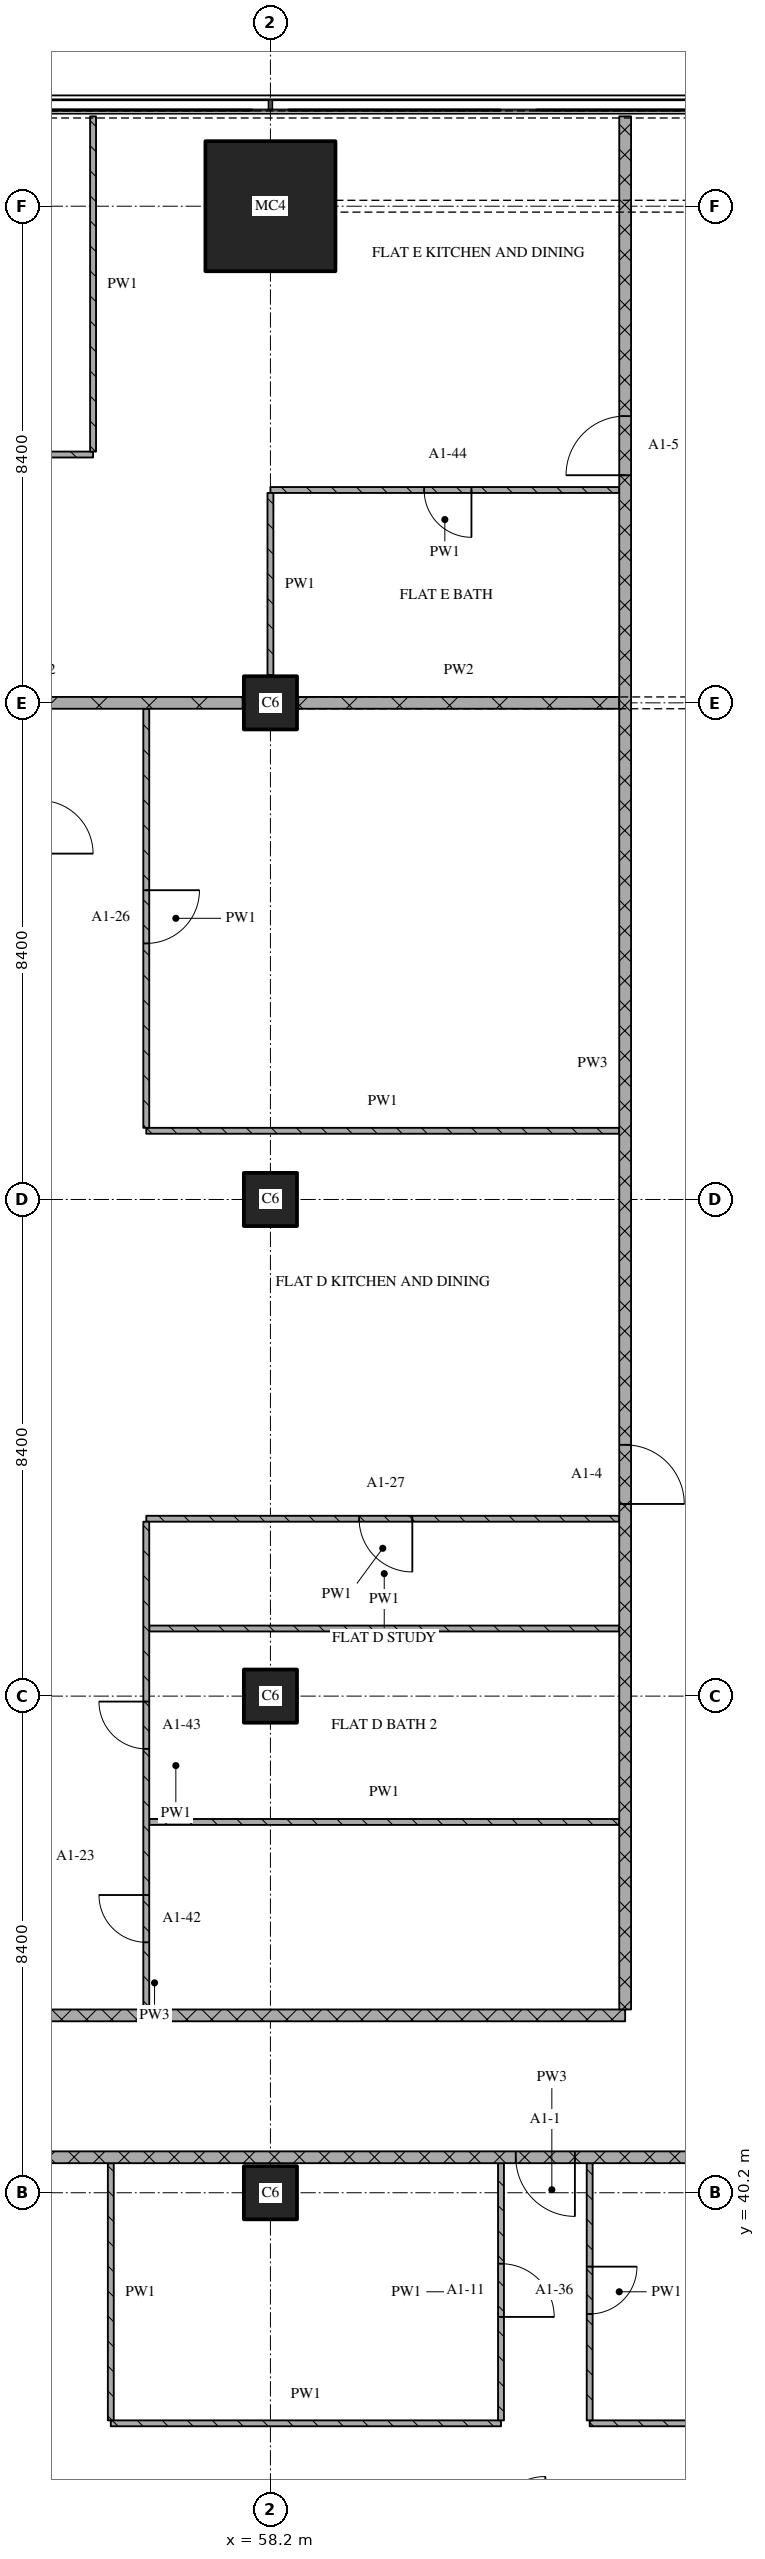
"""IFC4 building model, lengths in metres.
Left out: names, types, materials, properties, quantities, classifications, styles, units other than length and angle.
Written with IfcOpenShell. Run it as: python <this file> out.ifc"""

import sys

from ifc_helpers import new_model, si_unit, direction, frame, frame_2d, origin, origin_2d, place, context, subcontext, project, spatial, rectangle, extrude, element, fill, save


model = new_model("IFC4")
c1 = context("Model", 3, precision=1e-05, world=origin(), true_north=direction((0.0, 1.0)))
c2 = subcontext(c1, "Body", "Model", "MODEL_VIEW")
j1 = project(units=[si_unit("LENGTHUNIT", "METRE"), si_unit("PLANEANGLEUNIT", "RADIAN")], contexts=[c1])
p1 = place(None, origin())
s1 = spatial("IfcSite", under=j1, at=p1, CompositionType="ELEMENT")
p2 = place(p1, origin())
s2 = spatial("IfcBuilding", under=s1, at=p2, CompositionType="ELEMENT")
p3 = place(p2, frame((0.0, 0.0, 44.4)))
s3 = spatial("IfcBuildingStorey", under=s2, at=p3, CompositionType="ELEMENT", Elevation=44.4)
for number, where, z_axis, x_axis in (
    (1, (58.2, 40.2, 0.0), (0.0, 0.0, 1.0), (1.0, 0.0, 0.0)),
    (2, (58.2, 48.6, 0.0), (0.0, 0.0, 1.0), (1.0, 0.0, 0.0)),
    (3, (58.2, 57.0, 0.0), (0.0, 0.0, 1.0), (1.0, 0.0, 0.0)),
    (4, (58.2, 65.4, 0.0), (0.0, 0.0, 1.0), (1.0, 0.0, 0.0)),
):
    element("IfcColumn", number, at=place(p3, frame(where, z_axis=z_axis, x_axis=x_axis)), inside=s3, PredefinedType="COLUMN", context=c2, shape_type="SweptSolid", body=[
        extrude(rectangle(XDim=0.9, YDim=0.9, at=origin_2d()), origin(), (0.0, 0.0, 1.0), 3.6),
    ])
p4 = place(p3, frame((58.2, 73.8, 0.0), z_axis=(0.0, 0.0, 1.0), x_axis=(1.0, 0.0, 0.0)))
e5 = element("IfcColumn", 5, at=p4, inside=s3, PredefinedType="COLUMN", context=c2, shape_type="SweptSolid", body=[
    extrude(rectangle(XDim=2.2, YDim=2.2, at=origin_2d()), origin(), (0.0, 0.0, 1.0), 3.6),
])
p5 = place(p3, frame((55.5, 36.3, 0.0), z_axis=(0.0, 0.0, 1.0), x_axis=(1.0, 0.0, 0.0)))
e6 = element("IfcWall", 6, at=p5, inside=s3, PredefinedType="PARTITIONING", context=c2, shape_type="SweptSolid", body=[
    extrude(rectangle(XDim=6.6, YDim=0.1, at=frame_2d((3.3, 0.0))), origin(), (0.0, 0.0, 1.0), 3.32),
])
p6 = place(p3, frame((63.6, 36.3, 0.0), z_axis=(0.0, 0.0, 1.0), x_axis=(1.0, 0.0, 0.0)))
e7 = element("IfcWall", 7, at=p6, inside=s3, PredefinedType="PARTITIONING", context=c2, shape_type="SweptSolid", body=[
    extrude(rectangle(XDim=11.3, YDim=0.1, at=frame_2d((5.65, 0.0))), origin(), (0.0, 0.0, 1.0), 3.32),
])
p7 = place(p6, frame((6.35, 0.0, 0.0)))
e8 = element("IfcOpeningElement", 8, at=p7, cuts=e7, PredefinedType="OPENING", context=c2, shape_type="SweptSolid", body=[
    extrude(rectangle(XDim=0.8, YDim=2.1, at=frame_2d((0.4, 1.05))), frame((0.0, 0.06, 0.0), z_axis=(0.0, -1.0, 0.0), x_axis=(1.0, 0.0, 0.0)), (0.0, 0.0, 1.0), 0.12),
])
p8 = place(p6, frame((9.75, 0.0, 0.0)))
e9 = element("IfcOpeningElement", 9, at=p8, cuts=e7, PredefinedType="OPENING", context=c2, shape_type="SweptSolid", body=[
    extrude(rectangle(XDim=0.9, YDim=2.1, at=frame_2d((0.45, 1.05))), frame((0.0, 0.06, 0.0), z_axis=(0.0, -1.0, 0.0), x_axis=(1.0, 0.0, 0.0)), (0.0, 0.0, 1.0), 0.12),
])
p9 = place(p3, frame((75.0, 40.8, 0.0), z_axis=(0.0, 0.0, 1.0), x_axis=(-1.0, 0.0, 0.0)))
e10 = element("IfcWall", 10, at=p9, inside=s3, PredefinedType="PARTITIONING", context=c2, shape_type="SweptSolid", body=[
    extrude(rectangle(XDim=24.08, YDim=0.2, at=frame_2d((12.04, 0.0))), origin(), (0.0, 0.0, 1.0), 3.32),
])
p10 = place(p9, frame((11.65, 0.0, 0.0)))
e11 = element("IfcOpeningElement", 11, at=p10, cuts=e10, PredefinedType="OPENING", context=c2, shape_type="SweptSolid", body=[
    extrude(rectangle(XDim=1.0, YDim=2.1, at=frame_2d((0.5, 1.05))), frame((0.0, 0.11, 0.0), z_axis=(0.0, -1.0, 0.0), x_axis=(1.0, 0.0, 0.0)), (0.0, 0.0, 1.0), 0.22),
])
p11 = place(p3, frame((48.28, 43.2, 0.0), z_axis=(0.0, 0.0, 1.0), x_axis=(1.0, 0.0, 0.0)))
e12 = element("IfcWall", 12, at=p11, inside=s3, PredefinedType="PARTITIONING", context=c2, shape_type="SweptSolid", body=[
    extrude(rectangle(XDim=15.92, YDim=0.2, at=frame_2d((7.96, 0.0))), origin(), (0.0, 0.0, 1.0), 3.32),
])
for number, where, z_axis, x_axis in (
    (13, (56.15, 46.472, 0.0), (0.0, 0.0, 1.0), (1.0, 0.0, 0.0)),
    (14, (56.15, 49.743, 0.0), (0.0, 0.0, 1.0), (1.0, 0.0, 0.0)),
):
    element("IfcWall", number, at=place(p3, frame(where, z_axis=z_axis, x_axis=x_axis)), inside=s3, PredefinedType="PARTITIONING", context=c2, shape_type="SweptSolid", body=[
        extrude(rectangle(XDim=7.95, YDim=0.1, at=frame_2d((3.975, 0.0))), origin(), (0.0, 0.0, 1.0), 3.32),
    ])
p12 = place(p3, frame((64.1, 51.6, 0.0), z_axis=(0.0, 0.0, 1.0), x_axis=(-1.0, 0.0, 0.0)))
e15 = element("IfcWall", 15, at=p12, inside=s3, PredefinedType="PARTITIONING", context=c2, shape_type="SweptSolid", body=[
    extrude(rectangle(XDim=8.0, YDim=0.1, at=frame_2d((4.0, 0.0))), origin(), (0.0, 0.0, 1.0), 3.32),
])
p13 = place(p12, frame((3.5, 0.0, 0.0)))
e16 = element("IfcOpeningElement", 16, at=p13, cuts=e15, PredefinedType="OPENING", context=c2, shape_type="SweptSolid", body=[
    extrude(rectangle(XDim=0.9, YDim=2.1, at=frame_2d((0.45, 1.05))), frame((0.0, 0.06, 0.0), z_axis=(0.0, -1.0, 0.0), x_axis=(1.0, 0.0, 0.0)), (0.0, 0.0, 1.0), 0.12),
])
p14 = place(p3, frame((56.1, 58.162, 0.0), z_axis=(0.0, 0.0, 1.0), x_axis=(1.0, 0.0, 0.0)))
e17 = element("IfcWall", 17, at=p14, inside=s3, PredefinedType="PARTITIONING", context=c2, shape_type="SweptSolid", body=[
    extrude(rectangle(XDim=8.0, YDim=0.1, at=frame_2d((4.0, 0.0))), origin(), (0.0, 0.0, 1.0), 3.32),
])
p15 = place(p3, frame((50.92, 65.4, 0.0), z_axis=(0.0, 0.0, 1.0), x_axis=(1.0, 0.0, 0.0)))
e18 = element("IfcWall", 18, at=p15, inside=s3, PredefinedType="PARTITIONING", context=c2, shape_type="SweptSolid", body=[
    extrude(rectangle(XDim=6.81, YDim=0.2, at=frame_2d((3.405, 0.0))), origin(), (0.0, 0.0, 1.0), 3.32),
])
p16 = place(p3, frame((58.67, 65.4, 0.0), z_axis=(0.0, 0.0, 1.0), x_axis=(1.0, 0.0, 0.0)))
e19 = element("IfcWall", 19, at=p16, inside=s3, PredefinedType="PARTITIONING", context=c2, shape_type="SweptSolid", body=[
    extrude(rectangle(XDim=5.43, YDim=0.2, at=frame_2d((2.715, 0.0))), origin(), (0.0, 0.0, 1.0), 2.82),
])
p17 = place(p3, frame((64.1, 69.0, 0.0), z_axis=(0.0, 0.0, 1.0), x_axis=(-1.0, 0.0, 0.0)))
e20 = element("IfcWall", 20, at=p17, inside=s3, PredefinedType="PARTITIONING", context=c2, shape_type="SweptSolid", body=[
    extrude(rectangle(XDim=5.9, YDim=0.1, at=frame_2d((2.95, 0.0))), origin(), (0.0, 0.0, 1.0), 3.32),
])
p18 = place(p17, frame((2.5, 0.0, 0.0)))
e21 = element("IfcOpeningElement", 21, at=p18, cuts=e20, PredefinedType="OPENING", context=c2, shape_type="SweptSolid", body=[
    extrude(rectangle(XDim=0.8, YDim=2.1, at=frame_2d((0.4, 1.05))), frame((0.0, 0.06, 0.0), z_axis=(0.0, -1.0, 0.0), x_axis=(1.0, 0.0, 0.0)), (0.0, 0.0, 1.0), 0.12),
])
p19 = place(p3, frame((48.28, 69.6, 0.0), z_axis=(0.0, 0.0, 1.0), x_axis=(1.0, 0.0, 0.0)))
e22 = element("IfcWall", 22, at=p19, inside=s3, PredefinedType="PARTITIONING", context=c2, shape_type="SweptSolid", body=[
    extrude(rectangle(XDim=6.92, YDim=0.1, at=frame_2d((3.46, 0.0))), origin(), (0.0, 0.0, 1.0), 3.32),
])
p20 = place(p19, frame((3.905, 0.0, 0.0)))
e23 = element("IfcOpeningElement", 23, at=p20, cuts=e22, PredefinedType="OPENING", context=c2, shape_type="SweptSolid", body=[
    extrude(rectangle(XDim=0.9, YDim=2.1, at=frame_2d((0.45, 1.05))), frame((0.0, 0.06, 0.0), z_axis=(0.0, -1.0, 0.0), x_axis=(1.0, 0.0, 0.0)), (0.0, 0.0, 1.0), 0.12),
])
p21 = place(p3, frame((55.2, 75.32, 0.0), z_axis=(0.0, 0.0, 1.0), x_axis=(0.0, -1.0, 0.0)))
e24 = element("IfcWall", 24, at=p21, inside=s3, PredefinedType="PARTITIONING", context=c2, shape_type="SweptSolid", body=[
    extrude(rectangle(XDim=5.67, YDim=0.1, at=frame_2d((2.835, 0.0))), origin(), (0.0, 0.0, 1.0), 3.32),
])
p22 = place(p3, frame((55.5, 40.7, 0.0), z_axis=(0.0, 0.0, 1.0), x_axis=(0.0, -1.0, 0.0)))
e25 = element("IfcWall", 25, at=p22, inside=s3, PredefinedType="PARTITIONING", context=c2, shape_type="SweptSolid", body=[
    extrude(rectangle(XDim=4.35, YDim=0.1, at=frame_2d((2.175, 0.0))), origin(), (0.0, 0.0, 1.0), 3.32),
])
p23 = place(p3, frame((56.1, 51.55, 0.0), z_axis=(0.0, 0.0, 1.0), x_axis=(0.0, -1.0, 0.0)))
e26 = element("IfcWall", 26, at=p23, inside=s3, PredefinedType="PARTITIONING", context=c2, shape_type="SweptSolid", body=[
    extrude(rectangle(XDim=8.25, YDim=0.1, at=frame_2d((4.125, 0.0))), origin(), (0.0, 0.0, 1.0), 3.32),
])
p24 = place(p23, frame((3.042, 0.0, 0.0)))
e27 = element("IfcOpeningElement", 27, at=p24, cuts=e26, PredefinedType="OPENING", context=c2, shape_type="SweptSolid", body=[
    extrude(rectangle(XDim=0.8, YDim=2.1, at=frame_2d((0.4, 1.05))), frame((0.0, 0.06, 0.0), z_axis=(0.0, -1.0, 0.0), x_axis=(1.0, 0.0, 0.0)), (0.0, 0.0, 1.0), 0.12),
])
p25 = place(p23, frame((6.314, 0.0, 0.0)))
e28 = element("IfcOpeningElement", 28, at=p25, cuts=e26, PredefinedType="OPENING", context=c2, shape_type="SweptSolid", body=[
    extrude(rectangle(XDim=0.8, YDim=2.1, at=frame_2d((0.4, 1.05))), frame((0.0, 0.06, 0.0), z_axis=(0.0, -1.0, 0.0), x_axis=(1.0, 0.0, 0.0)), (0.0, 0.0, 1.0), 0.12),
])
p26 = place(p3, frame((56.1, 65.3, 0.0), z_axis=(0.0, 0.0, 1.0), x_axis=(0.0, -1.0, 0.0)))
e29 = element("IfcWall", 29, at=p26, inside=s3, PredefinedType="PARTITIONING", context=c2, shape_type="SweptSolid", body=[
    extrude(rectangle(XDim=7.088, YDim=0.1, at=frame_2d((3.544, 0.0))), origin(), (0.0, 0.0, 1.0), 3.32),
])
p27 = place(p26, frame((3.069, 0.0, 0.0)))
e30 = element("IfcOpeningElement", 30, at=p27, cuts=e29, PredefinedType="OPENING", context=c2, shape_type="SweptSolid", body=[
    extrude(rectangle(XDim=0.9, YDim=2.1, at=frame_2d((0.45, 1.05))), frame((0.0, 0.06, 0.0), z_axis=(0.0, -1.0, 0.0), x_axis=(1.0, 0.0, 0.0)), (0.0, 0.0, 1.0), 0.12),
])
p28 = place(p3, frame((58.2, 68.95, 0.0), z_axis=(0.0, 0.0, 1.0), x_axis=(0.0, -1.0, 0.0)))
e31 = element("IfcWall", 31, at=p28, inside=s3, PredefinedType="PARTITIONING", context=c2, shape_type="SweptSolid", body=[
    extrude(rectangle(XDim=3.08, YDim=0.1, at=frame_2d((1.54, 0.0))), origin(), (0.0, 0.0, 1.0), 3.32),
])
p29 = place(p3, frame((62.1, 36.35, 0.0), z_axis=(0.0, 0.0, 1.0), x_axis=(0.0, 1.0, 0.0)))
e32 = element("IfcWall", 32, at=p29, inside=s3, PredefinedType="PARTITIONING", context=c2, shape_type="SweptSolid", body=[
    extrude(rectangle(XDim=4.35, YDim=0.1, at=frame_2d((2.175, 0.0))), origin(), (0.0, 0.0, 1.0), 3.32),
])
p30 = place(p29, frame((1.75, 0.0, 0.0)))
e33 = element("IfcOpeningElement", 33, at=p30, cuts=e32, PredefinedType="OPENING", context=c2, shape_type="SweptSolid", body=[
    extrude(rectangle(XDim=0.9, YDim=2.1, at=frame_2d((0.45, 1.05))), frame((0.0, 0.06, 0.0), z_axis=(0.0, -1.0, 0.0), x_axis=(1.0, 0.0, 0.0)), (0.0, 0.0, 1.0), 0.12),
])
p31 = place(p3, frame((63.6, 40.7, 0.0), z_axis=(0.0, 0.0, 1.0), x_axis=(0.0, -1.0, 0.0)))
e34 = element("IfcWall", 34, at=p31, inside=s3, PredefinedType="PARTITIONING", context=c2, shape_type="SweptSolid", body=[
    extrude(rectangle(XDim=4.35, YDim=0.1, at=frame_2d((2.175, 0.0))), origin(), (0.0, 0.0, 1.0), 3.32),
])
p32 = place(p31, frame((1.75, 0.0, 0.0)))
e35 = element("IfcOpeningElement", 35, at=p32, cuts=e34, PredefinedType="OPENING", context=c2, shape_type="SweptSolid", body=[
    extrude(rectangle(XDim=0.8, YDim=2.1, at=frame_2d((0.4, 1.05))), frame((0.0, 0.06, 0.0), z_axis=(0.0, -1.0, 0.0), x_axis=(1.0, 0.0, 0.0)), (0.0, 0.0, 1.0), 0.12),
])
p33 = place(p3, frame((64.2, 43.3, 0.0), z_axis=(0.0, 0.0, 1.0), x_axis=(0.0, 1.0, 0.0)))
e36 = element("IfcWall", 36, at=p33, inside=s3, PredefinedType="PARTITIONING", context=c2, shape_type="SweptSolid", body=[
    extrude(rectangle(XDim=32.02, YDim=0.2, at=frame_2d((16.01, 0.0))), origin(), (0.0, 0.0, 1.0), 3.32),
])
p34 = place(p33, frame((8.55, 0.0, 0.0)))
e37 = element("IfcOpeningElement", 37, at=p34, cuts=e36, PredefinedType="OPENING", context=c2, shape_type="SweptSolid", body=[
    extrude(rectangle(XDim=1.0, YDim=2.1, at=frame_2d((0.5, 1.05))), frame((0.0, 0.11, 0.0), z_axis=(0.0, -1.0, 0.0), x_axis=(1.0, 0.0, 0.0)), (0.0, 0.0, 1.0), 0.22),
])
p35 = place(p33, frame((25.95, 0.0, 0.0)))
e38 = element("IfcOpeningElement", 38, at=p35, cuts=e36, PredefinedType="OPENING", context=c2, shape_type="SweptSolid", body=[
    extrude(rectangle(XDim=1.0, YDim=2.1, at=frame_2d((0.5, 1.05))), frame((0.0, 0.11, 0.0), z_axis=(0.0, -1.0, 0.0), x_axis=(1.0, 0.0, 0.0)), (0.0, 0.0, 1.0), 0.22),
])
p36 = place(p10, origin())
e39 = element("IfcDoor", 39, at=p36, inside=s3, OperationType="SINGLE_SWING_LEFT", PredefinedType="DOOR", context=c2, shape_type="SweptSolid", body=[
    extrude(rectangle(XDim=1.0, YDim=2.1, at=frame_2d((0.5, 1.05))), frame((0.0, 0.025, 0.0), z_axis=(0.0, -1.0, 0.0), x_axis=(1.0, 0.0, 0.0)), (0.0, 0.0, 1.0), 0.05),
])
fill(e11, e39)
p37 = place(p13, origin())
e40 = element("IfcDoor", 40, at=p37, inside=s3, OperationType="SINGLE_SWING_LEFT", PredefinedType="DOOR", context=c2, shape_type="SweptSolid", body=[
    extrude(rectangle(XDim=0.9, YDim=2.1, at=frame_2d((0.45, 1.05))), frame((0.0, 0.025, 0.0), z_axis=(0.0, -1.0, 0.0), x_axis=(1.0, 0.0, 0.0)), (0.0, 0.0, 1.0), 0.05),
])
fill(e16, e40)
p38 = place(p18, origin())
e41 = element("IfcDoor", 41, at=p38, inside=s3, OperationType="SINGLE_SWING_LEFT", PredefinedType="DOOR", context=c2, shape_type="SweptSolid", body=[
    extrude(rectangle(XDim=0.8, YDim=2.1, at=frame_2d((0.4, 1.05))), frame((0.0, 0.025, 0.0), z_axis=(0.0, -1.0, 0.0), x_axis=(1.0, 0.0, 0.0)), (0.0, 0.0, 1.0), 0.05),
])
fill(e21, e41)
p39 = place(p24, origin())
e42 = element("IfcDoor", 42, at=p39, inside=s3, OperationType="SINGLE_SWING_RIGHT", PredefinedType="DOOR", context=c2, shape_type="SweptSolid", body=[
    extrude(rectangle(XDim=0.8, YDim=2.1, at=frame_2d((0.4, 1.05))), frame((0.0, 0.025, 0.0), z_axis=(0.0, -1.0, 0.0), x_axis=(1.0, 0.0, 0.0)), (0.0, 0.0, 1.0), 0.05),
])
fill(e27, e42)
p40 = place(p25, origin())
e43 = element("IfcDoor", 43, at=p40, inside=s3, OperationType="SINGLE_SWING_RIGHT", PredefinedType="DOOR", context=c2, shape_type="SweptSolid", body=[
    extrude(rectangle(XDim=0.8, YDim=2.1, at=frame_2d((0.4, 1.05))), frame((0.0, 0.025, 0.0), z_axis=(0.0, -1.0, 0.0), x_axis=(1.0, 0.0, 0.0)), (0.0, 0.0, 1.0), 0.05),
])
fill(e28, e43)
p41 = place(p27, origin())
e44 = element("IfcDoor", 44, at=p41, inside=s3, OperationType="SINGLE_SWING_LEFT", PredefinedType="DOOR", context=c2, shape_type="SweptSolid", body=[
    extrude(rectangle(XDim=0.9, YDim=2.1, at=frame_2d((0.45, 1.05))), frame((0.0, 0.025, 0.0), z_axis=(0.0, -1.0, 0.0), x_axis=(1.0, 0.0, 0.0)), (0.0, 0.0, 1.0), 0.05),
])
fill(e30, e44)
p42 = place(p30, origin())
e45 = element("IfcDoor", 45, at=p42, inside=s3, OperationType="SINGLE_SWING_RIGHT", PredefinedType="DOOR", context=c2, shape_type="SweptSolid", body=[
    extrude(rectangle(XDim=0.9, YDim=2.1, at=frame_2d((0.45, 1.05))), frame((0.0, 0.025, 0.0), z_axis=(0.0, -1.0, 0.0), x_axis=(1.0, 0.0, 0.0)), (0.0, 0.0, 1.0), 0.05),
])
fill(e33, e45)
p43 = place(p32, origin())
e46 = element("IfcDoor", 46, at=p43, inside=s3, OperationType="SINGLE_SWING_LEFT", PredefinedType="DOOR", context=c2, shape_type="SweptSolid", body=[
    extrude(rectangle(XDim=0.8, YDim=2.1, at=frame_2d((0.4, 1.05))), frame((0.0, 0.025, 0.0), z_axis=(0.0, -1.0, 0.0), x_axis=(1.0, 0.0, 0.0)), (0.0, 0.0, 1.0), 0.05),
])
fill(e35, e46)
p44 = place(p34, origin())
e47 = element("IfcDoor", 47, at=p44, inside=s3, OperationType="SINGLE_SWING_RIGHT", PredefinedType="DOOR", context=c2, shape_type="SweptSolid", body=[
    extrude(rectangle(XDim=1.0, YDim=2.1, at=frame_2d((0.5, 1.05))), frame((0.0, 0.025, 0.0), z_axis=(0.0, -1.0, 0.0), x_axis=(1.0, 0.0, 0.0)), (0.0, 0.0, 1.0), 0.05),
])
fill(e37, e47)
p45 = place(p35, origin())
e48 = element("IfcDoor", 48, at=p45, inside=s3, OperationType="SINGLE_SWING_LEFT", PredefinedType="DOOR", context=c2, shape_type="SweptSolid", body=[
    extrude(rectangle(XDim=1.0, YDim=2.1, at=frame_2d((0.5, 1.05))), frame((0.0, 0.025, 0.0), z_axis=(0.0, -1.0, 0.0), x_axis=(1.0, 0.0, 0.0)), (0.0, 0.0, 1.0), 0.05),
])
fill(e38, e48)
save(model, sys.argv[1])
